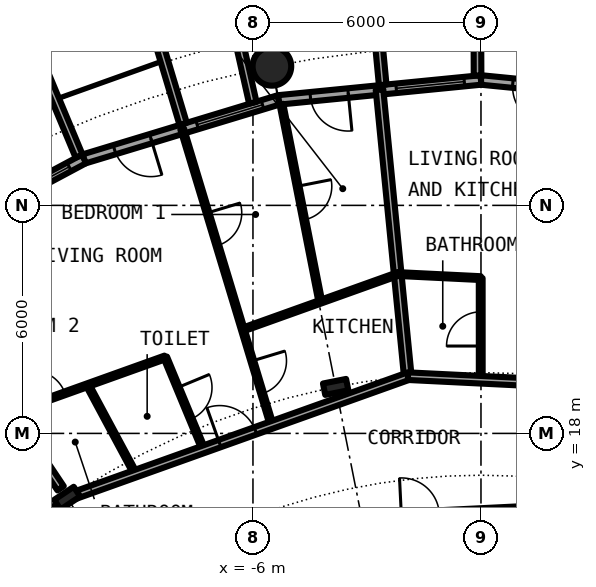
"""IFC4 building model, lengths in metres.
Left out: names, types, materials, properties, quantities, classifications, styles, units other than length and angle.
Written with IfcOpenShell. Run it as: python <this file> out.ifc"""

import sys

from ifc_helpers import new_model, si_unit, direction, frame, frame_2d, origin, origin_2d, place, context, subcontext, project, spatial, rectangle, hollow_circle, i_section, extrude, element, fill, save


model = new_model("IFC4")
c1 = context("Model", 3, precision=1e-05, world=origin(), true_north=direction((0.0, 1.0)))
c2 = subcontext(c1, "Body", "Model", "MODEL_VIEW")
j1 = project(units=[si_unit("LENGTHUNIT", "METRE"), si_unit("PLANEANGLEUNIT", "RADIAN")], contexts=[c1])
p1 = place(None, origin())
s1 = spatial("IfcSite", under=j1, at=p1, CompositionType="ELEMENT")
p2 = place(p1, origin())
s2 = spatial("IfcBuilding", under=s1, at=p2, CompositionType="ELEMENT")
p3 = place(p2, frame((0.0, 0.0, 41.1)))
s3 = spatial("IfcBuildingStorey", under=s2, at=p3, CompositionType="ELEMENT", Elevation=41.1)
p4 = place(p3, frame((-5.501, 27.658, 0.0), z_axis=(0.0, 0.0, 1.0), x_axis=(1.0, 0.0, 0.0)))
e1 = element("IfcColumn", 1, at=p4, inside=s3, PredefinedType="COLUMN", context=c2, shape_type="SweptSolid", body=[
    extrude(hollow_circle(Radius=0.508, WallThickness=0.05, at=origin_2d()), origin(), (0.0, 0.0, 1.0), 3.05),
])
for number, where, z_axis, x_axis in (
    (2, (-3.824, 19.223, 0.0), (0.0, 0.0, 1.0), (-0.195, 0.981, 0.0)),
    (3, (-10.889, 16.297, 0.0), (0.0, 0.0, 1.0), (-0.556, 0.831, 0.0)),
):
    element("IfcColumn", number, at=place(p3, frame(where, z_axis=z_axis, x_axis=x_axis)), inside=s3, PredefinedType="COLUMN", context=c2, shape_type="SweptSolid", body=[
        extrude(i_section(OverallWidth=0.305, OverallDepth=0.62, WebThickness=0.021, FlangeThickness=0.04, FilletRadius=0.027, at=origin_2d()), origin(), (0.0, 0.0, 1.0), 3.05),
    ])
p5 = place(p3, frame((5.326, 26.775, 0.0), z_axis=(0.0, 0.0, 1.0), x_axis=(-0.995173996315, 0.098126026407, 0.0)))
e4 = element("IfcWall", 4, at=p5, inside=s3, PredefinedType="SOLIDWALL", context=c2, shape_type="SweptSolid", body=[
    extrude(rectangle(XDim=5.352, YDim=0.25, at=frame_2d((2.676, 0.0))), origin(), (0.0, 0.0, 1.0), 2.7),
])
p6 = place(p5, frame((0.441, 0.0, 0.3)))
e5 = element("IfcOpeningElement", 5, at=p6, cuts=e4, PredefinedType="OPENING", context=c2, shape_type="SweptSolid", body=[
    extrude(rectangle(XDim=1.8, YDim=2.1, at=frame_2d((0.9, 1.05))), frame((0.0, 0.135, 0.0), z_axis=(0.0, -1.0, 0.0), x_axis=(1.0, 0.0, 0.0)), (0.0, 0.0, 1.0), 0.27),
])
p7 = place(p5, frame((3.51, 0.0, 0.0)))
e6 = element("IfcOpeningElement", 6, at=p7, cuts=e4, PredefinedType="OPENING", context=c2, shape_type="SweptSolid", body=[
    extrude(rectangle(XDim=1.0, YDim=2.2, at=frame_2d((0.5, 1.1))), frame((0.0, 0.135, 0.0), z_axis=(0.0, -1.0, 0.0), x_axis=(1.0, 0.0, 0.0)), (0.0, 0.0, 1.0), 0.27),
])
p8 = place(p3, frame((0.0, 27.3, 0.0), z_axis=(0.0, 0.0, 1.0), x_axis=(-0.995173996315, -0.098126026407, 0.0)))
e7 = element("IfcWall", 7, at=p8, inside=s3, PredefinedType="SOLIDWALL", context=c2, shape_type="SweptSolid", body=[
    extrude(rectangle(XDim=5.352, YDim=0.25, at=frame_2d((2.676, 0.0))), origin(), (0.0, 0.0, 1.0), 2.7),
])
p9 = place(p8, frame((0.441, 0.0, 0.3)))
e8 = element("IfcOpeningElement", 8, at=p9, cuts=e7, PredefinedType="OPENING", context=c2, shape_type="SweptSolid", body=[
    extrude(rectangle(XDim=1.8, YDim=2.1, at=frame_2d((0.9, 1.05))), frame((0.0, 0.135, 0.0), z_axis=(0.0, -1.0, 0.0), x_axis=(1.0, 0.0, 0.0)), (0.0, 0.0, 1.0), 0.27),
])
p10 = place(p8, frame((3.51, 0.0, 0.0)))
e9 = element("IfcOpeningElement", 9, at=p10, cuts=e7, PredefinedType="OPENING", context=c2, shape_type="SweptSolid", body=[
    extrude(rectangle(XDim=1.0, YDim=2.2, at=frame_2d((0.5, 1.1))), frame((0.0, 0.135, 0.0), z_axis=(0.0, -1.0, 0.0), x_axis=(1.0, 0.0, 0.0)), (0.0, 0.0, 1.0), 0.27),
])
p11 = place(p3, frame((-0.09, 27.417, -0.03), z_axis=(0.0, 0.0, 1.0), x_axis=(-0.00347308367, 0.999993968827, 0.0)))
e10 = element("IfcWall", 10, at=p11, inside=s3, PredefinedType="SOLIDWALL", context=c2, shape_type="SweptSolid", body=[
    extrude(rectangle(XDim=2.882, YDim=0.2, at=frame_2d((1.441, 0.0))), origin(), (0.0, 0.0, 1.0), 2.73),
])
p12 = place(p3, frame((-2.586, 27.171, -0.03), z_axis=(0.0, 0.0, 1.0), x_axis=(-0.094548432284, 0.995520262954, 0.0)))
e11 = element("IfcWall", 11, at=p12, inside=s3, PredefinedType="SOLIDWALL", context=c2, shape_type="SweptSolid", body=[
    extrude(rectangle(XDim=3.006, YDim=0.2, at=frame_2d((1.503, 0.0))), origin(), (0.0, 0.0, 1.0), 2.73),
])
p13 = place(p3, frame((-5.326, 26.775, 0.0), z_axis=(0.0, 0.0, 1.0), x_axis=(-0.956965678721, -0.290201119486, 0.0)))
e12 = element("IfcWall", 12, at=p13, inside=s3, PredefinedType="SOLIDWALL", context=c2, shape_type="SweptSolid", body=[
    extrude(rectangle(XDim=5.351, YDim=0.25, at=frame_2d((2.676, 0.0))), origin(), (0.0, 0.0, 1.0), 2.7),
])
p14 = place(p13, frame((0.441, 0.0, 0.3)))
e13 = element("IfcOpeningElement", 13, at=p14, cuts=e12, PredefinedType="OPENING", context=c2, shape_type="SweptSolid", body=[
    extrude(rectangle(XDim=1.8, YDim=2.1, at=frame_2d((0.9, 1.05))), frame((0.0, 0.135, 0.0), z_axis=(0.0, -1.0, 0.0), x_axis=(1.0, 0.0, 0.0)), (0.0, 0.0, 1.0), 0.27),
])
p15 = place(p13, frame((3.51, 0.0, 0.0)))
e14 = element("IfcOpeningElement", 14, at=p15, cuts=e12, PredefinedType="OPENING", context=c2, shape_type="SweptSolid", body=[
    extrude(rectangle(XDim=1.0, YDim=2.2, at=frame_2d((0.5, 1.1))), frame((0.0, 0.135, 0.0), z_axis=(0.0, -1.0, 0.0), x_axis=(1.0, 0.0, 0.0)), (0.0, 0.0, 1.0), 0.27),
])
p16 = place(p3, frame((-6.004, 26.7, -0.03), z_axis=(0.0, 0.0, 1.0), x_axis=(-0.219609259383, 0.975587911566, 0.0)))
e15 = element("IfcWall", 15, at=p16, inside=s3, PredefinedType="SOLIDWALL", context=c2, shape_type="SweptSolid", body=[
    extrude(rectangle(XDim=2.933, YDim=0.2, at=frame_2d((1.466, 0.0))), origin(), (0.0, 0.0, 1.0), 2.73),
])
p17 = place(p3, frame((-7.837, 26.144, -0.03), z_axis=(0.0, 0.0, 1.0), x_axis=(-0.287064767992, 0.957911174889, 0.0)))
e16 = element("IfcWall", 16, at=p17, inside=s3, PredefinedType="SOLIDWALL", context=c2, shape_type="SweptSolid", body=[
    extrude(rectangle(XDim=3.006, YDim=0.2, at=frame_2d((1.503, 0.0))), origin(), (0.0, 0.0, 1.0), 2.73),
])
p18 = place(p3, frame((-10.447, 25.222, 0.0), z_axis=(0.0, 0.0, 1.0), x_axis=(-0.881915646801, -0.471407246368, 0.0)))
e17 = element("IfcWall", 17, at=p18, inside=s3, PredefinedType="SOLIDWALL", context=c2, shape_type="SweptSolid", body=[
    extrude(rectangle(XDim=5.352, YDim=0.25, at=frame_2d((2.676, 0.0))), origin(), (0.0, 0.0, 1.0), 2.7),
])
p19 = place(p18, frame((0.441, 0.0, 0.3)))
e18 = element("IfcOpeningElement", 18, at=p19, cuts=e17, PredefinedType="OPENING", context=c2, shape_type="SweptSolid", body=[
    extrude(rectangle(XDim=1.8, YDim=2.1, at=frame_2d((0.9, 1.05))), frame((0.0, 0.135, 0.0), z_axis=(0.0, -1.0, 0.0), x_axis=(1.0, 0.0, 0.0)), (0.0, 0.0, 1.0), 0.27),
])
p20 = place(p18, frame((3.51, 0.0, 0.0)))
e19 = element("IfcOpeningElement", 19, at=p20, cuts=e17, PredefinedType="OPENING", context=c2, shape_type="SweptSolid", body=[
    extrude(rectangle(XDim=1.0, YDim=2.2, at=frame_2d((0.5, 1.1))), frame((0.0, 0.135, 0.0), z_axis=(0.0, -1.0, 0.0), x_axis=(1.0, 0.0, 0.0)), (0.0, 0.0, 1.0), 0.27),
])
p21 = place(p3, frame((-10.575, 25.295, -0.03), z_axis=(0.0, 0.0, 1.0), x_axis=(-0.385697364644, 0.922625353492, 0.0)))
e20 = element("IfcWall", 20, at=p21, inside=s3, PredefinedType="SOLIDWALL", context=c2, shape_type="SweptSolid", body=[
    extrude(rectangle(XDim=2.883, YDim=0.2, at=frame_2d((1.442, 0.0))), origin(), (0.0, 0.0, 1.0), 2.73),
])
p22 = place(p3, frame((-15.097, 22.595, 0.0), z_axis=(0.0, 0.0, 1.0), x_axis=(0.555576285599, -0.831465568067, 0.0)))
e21 = element("IfcWall", 21, at=p22, inside=s3, PredefinedType="PARTITIONING", context=c2, shape_type="SweptSolid", body=[
    extrude(rectangle(XDim=7.264, YDim=0.2, at=frame_2d((3.632, 0.0))), origin(), (0.0, 0.0, 1.0), 2.7),
])
p23 = place(p3, frame((-10.349, 19.272, 0.0), z_axis=(0.0, 0.0, 1.0), x_axis=(0.473203488521, -0.880953153381, 0.0)))
e22 = element("IfcWall", 22, at=p23, inside=s3, PredefinedType="PARTITIONING", context=c2, shape_type="SweptSolid", body=[
    extrude(rectangle(XDim=2.648, YDim=0.1, at=frame_2d((1.324, 0.0))), origin(), (0.0, 0.0, 1.0), 2.7),
])
p24 = place(p3, frame((-8.308, 20.002, 0.0), z_axis=(0.0, 0.0, 1.0), x_axis=(0.38363686428, -0.923484031462, 0.0)))
e23 = element("IfcWall", 23, at=p24, inside=s3, PredefinedType="PARTITIONING", context=c2, shape_type="SweptSolid", body=[
    extrude(rectangle(XDim=2.623, YDim=0.1, at=frame_2d((1.311, 0.0))), origin(), (0.0, 0.0, 1.0), 2.7),
])
p25 = place(p24, frame((0.861, 0.0, 0.0)))
e24 = element("IfcOpeningElement", 24, at=p25, cuts=e23, PredefinedType="OPENING", context=c2, shape_type="SweptSolid", body=[
    extrude(rectangle(XDim=0.9, YDim=2.3, at=frame_2d((0.45, 1.15))), frame((0.0, 0.06, 0.0), z_axis=(0.0, -1.0, 0.0), x_axis=(1.0, 0.0, 0.0)), (0.0, 0.0, 1.0), 0.12),
])
p26 = place(p3, frame((-7.863, 26.012, 0.0), z_axis=(0.0, 0.0, 1.0), x_axis=(0.289372881225, -0.957216451808, 0.0)))
e25 = element("IfcWall", 25, at=p26, inside=s3, PredefinedType="PARTITIONING", context=c2, shape_type="SweptSolid", body=[
    extrude(rectangle(XDim=8.138, YDim=0.1, at=frame_2d((4.069, 0.0))), origin(), (0.0, 0.0, 1.0), 2.7),
])
p27 = place(p26, frame((6.377, 0.0, 0.0)))
e26 = element("IfcOpeningElement", 26, at=p27, cuts=e25, PredefinedType="OPENING", context=c2, shape_type="SweptSolid", body=[
    extrude(rectangle(XDim=0.9, YDim=2.3, at=frame_2d((0.45, 1.15))), frame((0.0, 0.06, 0.0), z_axis=(0.0, -1.0, 0.0), x_axis=(1.0, 0.0, 0.0)), (0.0, 0.0, 1.0), 0.12),
])
p28 = place(p26, frame((2.308, 0.0, 0.0)))
e27 = element("IfcOpeningElement", 27, at=p28, cuts=e25, PredefinedType="OPENING", context=c2, shape_type="SweptSolid", body=[
    extrude(rectangle(XDim=0.9, YDim=2.3, at=frame_2d((0.45, 1.15))), frame((0.0, 0.06, 0.0), z_axis=(0.0, -1.0, 0.0), x_axis=(1.0, 0.0, 0.0)), (0.0, 0.0, 1.0), 0.12),
])
p29 = place(p3, frame((-5.251, 26.663, 0.0), z_axis=(0.0, 0.0, 1.0), x_axis=(0.193334397611, -0.981132922035, 0.0)))
e28 = element("IfcWall", 28, at=p29, inside=s3, PredefinedType="PARTITIONING", context=c2, shape_type="SweptSolid", body=[
    extrude(rectangle(XDim=5.301, YDim=0.1, at=frame_2d((2.651, 0.0))), origin(), (0.0, 0.0, 1.0), 2.7),
])
p30 = place(p29, frame((2.201, 0.0, 0.0)))
e29 = element("IfcOpeningElement", 29, at=p30, cuts=e28, PredefinedType="OPENING", context=c2, shape_type="SweptSolid", body=[
    extrude(rectangle(XDim=0.9, YDim=2.3, at=frame_2d((0.45, 1.15))), frame((0.0, 0.06, 0.0), z_axis=(0.0, -1.0, 0.0), x_axis=(1.0, 0.0, 0.0)), (0.0, 0.0, 1.0), 0.12),
])
p31 = place(p3, frame((-2.67, 27.043, 0.0), z_axis=(0.0, 0.0, 1.0), x_axis=(0.098208010272, -0.995165909142, 0.0)))
e30 = element("IfcWall", 30, at=p31, inside=s3, PredefinedType="PARTITIONING", context=c2, shape_type="SweptSolid", body=[
    extrude(rectangle(XDim=7.575, YDim=0.2, at=frame_2d((3.787, 0.0))), origin(), (0.0, 0.0, 1.0), 2.7),
])
p32 = place(p3, frame((-0.006, 19.412, 0.0), z_axis=(0.0, 0.0, 1.0), x_axis=(-0.000365230071, 0.999999933303, 0.0)))
e31 = element("IfcWall", 31, at=p32, inside=s3, PredefinedType="PARTITIONING", context=c2, shape_type="SweptSolid", body=[
    extrude(rectangle(XDim=2.674, YDim=0.1, at=frame_2d((1.337, 0.0))), origin(), (0.0, 0.0, 1.0), 2.7),
])
p33 = place(p32, frame((0.887, 0.0, 0.0)))
e32 = element("IfcOpeningElement", 32, at=p33, cuts=e31, PredefinedType="OPENING", context=c2, shape_type="SweptSolid", body=[
    extrude(rectangle(XDim=0.9, YDim=2.3, at=frame_2d((0.45, 1.15))), frame((0.0, 0.06, 0.0), z_axis=(0.0, -1.0, 0.0), x_axis=(1.0, 0.0, 0.0)), (0.0, 0.0, 1.0), 0.12),
])
p34 = place(p3, frame((-6.472, 15.613, 0.0), z_axis=(0.0, 0.0, 1.0), x_axis=(0.998789903976, 0.049180562371, 0.0)))
e33 = element("IfcWall", 33, at=p34, inside=s3, PredefinedType="PARTITIONING", context=c2, shape_type="SweptSolid", body=[
    extrude(rectangle(XDim=11.388, YDim=0.2, at=frame_2d((5.694, 0.0))), origin(), (0.0, 0.0, 1.0), 2.7),
])
p35 = place(p34, frame((4.383, 0.0, 0.0)))
e34 = element("IfcOpeningElement", 34, at=p35, cuts=e33, PredefinedType="OPENING", context=c2, shape_type="SweptSolid", body=[
    extrude(rectangle(XDim=1.0, YDim=2.3, at=frame_2d((0.5, 1.15))), frame((0.0, 0.11, 0.0), z_axis=(0.0, -1.0, 0.0), x_axis=(1.0, 0.0, 0.0)), (0.0, 0.0, 1.0), 0.22),
])
p36 = place(p3, frame((-10.742, 16.351, 0.0), z_axis=(0.0, 0.0, 1.0), x_axis=(0.941707755593, 0.336432018476, 0.0)))
e35 = element("IfcWall", 35, at=p36, inside=s3, PredefinedType="PARTITIONING", context=c2, shape_type="SweptSolid", body=[
    extrude(rectangle(XDim=9.381, YDim=0.2, at=frame_2d((4.69, 0.0))), origin(), (0.0, 0.0, 1.0), 2.38),
])
p37 = place(p36, frame((4.106, 0.0, 0.0)))
e36 = element("IfcOpeningElement", 36, at=p37, cuts=e35, PredefinedType="OPENING", context=c2, shape_type="SweptSolid", body=[
    extrude(rectangle(XDim=1.0, YDim=2.3, at=frame_2d((0.5, 1.15))), frame((0.0, 0.11, 0.0), z_axis=(0.0, -1.0, 0.0), x_axis=(1.0, 0.0, 0.0)), (0.0, 0.0, 1.0), 0.22),
])
p38 = place(p3, frame((-16.187, 10.999, 0.0), z_axis=(0.0, 0.0, 1.0), x_axis=(0.707106781187, 0.707106781187, 0.0)))
e37 = element("IfcWall", 37, at=p38, inside=s3, PredefinedType="PARTITIONING", context=c2, shape_type="SweptSolid", body=[
    extrude(rectangle(XDim=7.337, YDim=0.2, at=frame_2d((3.668, 0.0))), origin(), (0.0, 0.0, 1.0), 2.38),
])
p39 = place(p38, frame((4.124, 0.0, 0.0)))
e38 = element("IfcOpeningElement", 38, at=p39, cuts=e37, PredefinedType="OPENING", context=c2, shape_type="SweptSolid", body=[
    extrude(rectangle(XDim=1.0, YDim=2.3, at=frame_2d((0.5, 1.15))), frame((0.0, 0.11, 0.0), z_axis=(0.0, -1.0, 0.0), x_axis=(1.0, 0.0, 0.0)), (0.0, 0.0, 1.0), 0.22),
])
p40 = place(p3, frame((-1.921, 19.506, 0.0), z_axis=(0.0, 0.0, 1.0), x_axis=(0.99879118777, -0.049154483346, 0.0)))
e39 = element("IfcWall", 39, at=p40, inside=s3, PredefinedType="PARTITIONING", context=c2, shape_type="SweptSolid", body=[
    extrude(rectangle(XDim=5.598, YDim=0.2, at=frame_2d((2.799, 0.0))), origin(), (0.0, 0.0, 1.0), 2.38),
])
p41 = place(p40, frame((3.334, 0.0, 0.0)))
e40 = element("IfcOpeningElement", 40, at=p41, cuts=e39, PredefinedType="OPENING", context=c2, shape_type="SweptSolid", body=[
    extrude(rectangle(XDim=1.0, YDim=2.3, at=frame_2d((0.5, 1.15))), frame((0.0, 0.11, 0.0), z_axis=(0.0, -1.0, 0.0), x_axis=(1.0, 0.0, 0.0)), (0.0, 0.0, 1.0), 0.22),
])
p42 = place(p3, frame((-12.393, 18.539, 0.0), z_axis=(0.0, 0.0, 1.0), x_axis=(0.941491894739, 0.337035624439, 0.0)))
e41 = element("IfcWall", 41, at=p42, inside=s3, PredefinedType="PARTITIONING", context=c2, shape_type="SweptSolid", body=[
    extrude(rectangle(XDim=4.335, YDim=0.1, at=frame_2d((2.167, 0.0))), origin(), (0.0, 0.0, 1.0), 2.7),
])
p43 = place(p42, frame((0.637, 0.0, 0.0)))
e42 = element("IfcOpeningElement", 42, at=p43, cuts=e41, PredefinedType="OPENING", context=c2, shape_type="SweptSolid", body=[
    extrude(rectangle(XDim=0.9, YDim=2.3, at=frame_2d((0.45, 1.15))), frame((0.0, 0.06, 0.0), z_axis=(0.0, -1.0, 0.0), x_axis=(1.0, 0.0, 0.0)), (0.0, 0.0, 1.0), 0.12),
])
p44 = place(p3, frame((-6.273, 20.73, 0.0), z_axis=(0.0, 0.0, 1.0), x_axis=(0.941501535708, 0.337008691666, 0.0)))
e43 = element("IfcWall", 43, at=p44, inside=s3, PredefinedType="PARTITIONING", context=c2, shape_type="SweptSolid", body=[
    extrude(rectangle(XDim=4.347, YDim=0.1, at=frame_2d((2.174, 0.0))), origin(), (0.0, 0.0, 1.0), 2.7),
])
p45 = place(p3, frame((-2.186, 22.193, 0.0), z_axis=(0.0, 0.0, 1.0), x_axis=(0.998792477005, -0.049128279821, 0.0)))
e44 = element("IfcWall", 44, at=p45, inside=s3, PredefinedType="PARTITIONING", context=c2, shape_type="SweptSolid", body=[
    extrude(rectangle(XDim=2.182, YDim=0.1, at=frame_2d((1.091, 0.0))), origin(), (0.0, 0.0, 1.0), 2.7),
])
p46 = place(p7, origin())
e45 = element("IfcDoor", 45, at=p46, inside=s3, OperationType="SINGLE_SWING_LEFT", PredefinedType="DOOR", context=c2, shape_type="SweptSolid", body=[
    extrude(rectangle(XDim=1.0, YDim=2.2, at=frame_2d((0.5, 1.1))), frame((0.0, 0.025, 0.0), z_axis=(0.0, -1.0, 0.0), x_axis=(1.0, 0.0, 0.0)), (0.0, 0.0, 1.0), 0.05),
])
fill(e6, e45)
p47 = place(p9, origin())
e46 = element("IfcWindow", 46, at=p47, inside=s3, PartitioningType="SINGLE_PANEL", PredefinedType="WINDOW", context=c2, shape_type="SweptSolid", body=[
    extrude(rectangle(XDim=1.8, YDim=2.1, at=frame_2d((0.9, 1.05))), frame((0.0, 0.03, 0.0), z_axis=(0.0, -1.0, 0.0), x_axis=(1.0, 0.0, 0.0)), (0.0, 0.0, 1.0), 0.06),
])
fill(e8, e46)
p48 = place(p10, origin())
e47 = element("IfcDoor", 47, at=p48, inside=s3, OperationType="SINGLE_SWING_LEFT", PredefinedType="DOOR", context=c2, shape_type="SweptSolid", body=[
    extrude(rectangle(XDim=1.0, YDim=2.2, at=frame_2d((0.5, 1.1))), frame((0.0, 0.025, 0.0), z_axis=(0.0, -1.0, 0.0), x_axis=(1.0, 0.0, 0.0)), (0.0, 0.0, 1.0), 0.05),
])
fill(e9, e47)
p49 = place(p14, origin())
e48 = element("IfcWindow", 48, at=p49, inside=s3, PartitioningType="SINGLE_PANEL", PredefinedType="WINDOW", context=c2, shape_type="SweptSolid", body=[
    extrude(rectangle(XDim=1.8, YDim=2.1, at=frame_2d((0.9, 1.05))), frame((0.0, 0.03, 0.0), z_axis=(0.0, -1.0, 0.0), x_axis=(1.0, 0.0, 0.0)), (0.0, 0.0, 1.0), 0.06),
])
fill(e13, e48)
p50 = place(p15, origin())
e49 = element("IfcDoor", 49, at=p50, inside=s3, OperationType="SINGLE_SWING_LEFT", PredefinedType="DOOR", context=c2, shape_type="SweptSolid", body=[
    extrude(rectangle(XDim=1.0, YDim=2.2, at=frame_2d((0.5, 1.1))), frame((0.0, 0.025, 0.0), z_axis=(0.0, -1.0, 0.0), x_axis=(1.0, 0.0, 0.0)), (0.0, 0.0, 1.0), 0.05),
])
fill(e14, e49)
p51 = place(p19, origin())
e50 = element("IfcWindow", 50, at=p51, inside=s3, PartitioningType="SINGLE_PANEL", PredefinedType="WINDOW", context=c2, shape_type="SweptSolid", body=[
    extrude(rectangle(XDim=1.8, YDim=2.1, at=frame_2d((0.9, 1.05))), frame((0.0, 0.03, 0.0), z_axis=(0.0, -1.0, 0.0), x_axis=(1.0, 0.0, 0.0)), (0.0, 0.0, 1.0), 0.06),
])
fill(e18, e50)
p52 = place(p33, origin())
e51 = element("IfcDoor", 51, at=p52, inside=s3, OperationType="SINGLE_SWING_LEFT", PredefinedType="DOOR", context=c2, shape_type="SweptSolid", body=[
    extrude(rectangle(XDim=0.9, YDim=2.3, at=frame_2d((0.45, 1.15))), frame((0.0, 0.025, 0.0), z_axis=(0.0, -1.0, 0.0), x_axis=(1.0, 0.0, 0.0)), (0.0, 0.0, 1.0), 0.05),
])
fill(e32, e51)
p53 = place(p37, origin())
e52 = element("IfcDoor", 52, at=p53, inside=s3, OperationType="SINGLE_SWING_LEFT", PredefinedType="DOOR", context=c2, shape_type="SweptSolid", body=[
    extrude(rectangle(XDim=1.0, YDim=2.3, at=frame_2d((0.5, 1.15))), frame((0.0, 0.025, 0.0), z_axis=(0.0, -1.0, 0.0), x_axis=(1.0, 0.0, 0.0)), (0.0, 0.0, 1.0), 0.05),
])
fill(e36, e52)
p54 = place(p43, origin())
e53 = element("IfcDoor", 53, at=p54, inside=s3, OperationType="SINGLE_SWING_LEFT", PredefinedType="DOOR", context=c2, shape_type="SweptSolid", body=[
    extrude(rectangle(XDim=0.9, YDim=2.3, at=frame_2d((0.45, 1.15))), frame((0.0, 0.025, 0.0), z_axis=(0.0, -1.0, 0.0), x_axis=(1.0, 0.0, 0.0)), (0.0, 0.0, 1.0), 0.05),
])
fill(e42, e53)
p55 = place(p25, origin())
e54 = element("IfcDoor", 54, at=p55, inside=s3, OperationType="SINGLE_SWING_RIGHT", PredefinedType="DOOR", context=c2, shape_type="SweptSolid", body=[
    extrude(rectangle(XDim=0.9, YDim=2.3, at=frame_2d((0.45, 1.15))), frame((0.0, 0.025, 0.0), z_axis=(0.0, -1.0, 0.0), x_axis=(1.0, 0.0, 0.0)), (0.0, 0.0, 1.0), 0.05),
])
fill(e24, e54)
p56 = place(p27, origin())
e55 = element("IfcDoor", 55, at=p56, inside=s3, OperationType="SINGLE_SWING_RIGHT", PredefinedType="DOOR", context=c2, shape_type="SweptSolid", body=[
    extrude(rectangle(XDim=0.9, YDim=2.3, at=frame_2d((0.45, 1.15))), frame((0.0, 0.025, 0.0), z_axis=(0.0, -1.0, 0.0), x_axis=(1.0, 0.0, 0.0)), (0.0, 0.0, 1.0), 0.05),
])
fill(e26, e55)
p57 = place(p28, origin())
e56 = element("IfcDoor", 56, at=p57, inside=s3, OperationType="SINGLE_SWING_LEFT", PredefinedType="DOOR", context=c2, shape_type="SweptSolid", body=[
    extrude(rectangle(XDim=0.9, YDim=2.3, at=frame_2d((0.45, 1.15))), frame((0.0, 0.025, 0.0), z_axis=(0.0, -1.0, 0.0), x_axis=(1.0, 0.0, 0.0)), (0.0, 0.0, 1.0), 0.05),
])
fill(e27, e56)
p58 = place(p30, origin())
e57 = element("IfcDoor", 57, at=p58, inside=s3, OperationType="SINGLE_SWING_LEFT", PredefinedType="DOOR", context=c2, shape_type="SweptSolid", body=[
    extrude(rectangle(XDim=0.9, YDim=2.3, at=frame_2d((0.45, 1.15))), frame((0.0, 0.025, 0.0), z_axis=(0.0, -1.0, 0.0), x_axis=(1.0, 0.0, 0.0)), (0.0, 0.0, 1.0), 0.05),
])
fill(e29, e57)
save(model, sys.argv[1])
